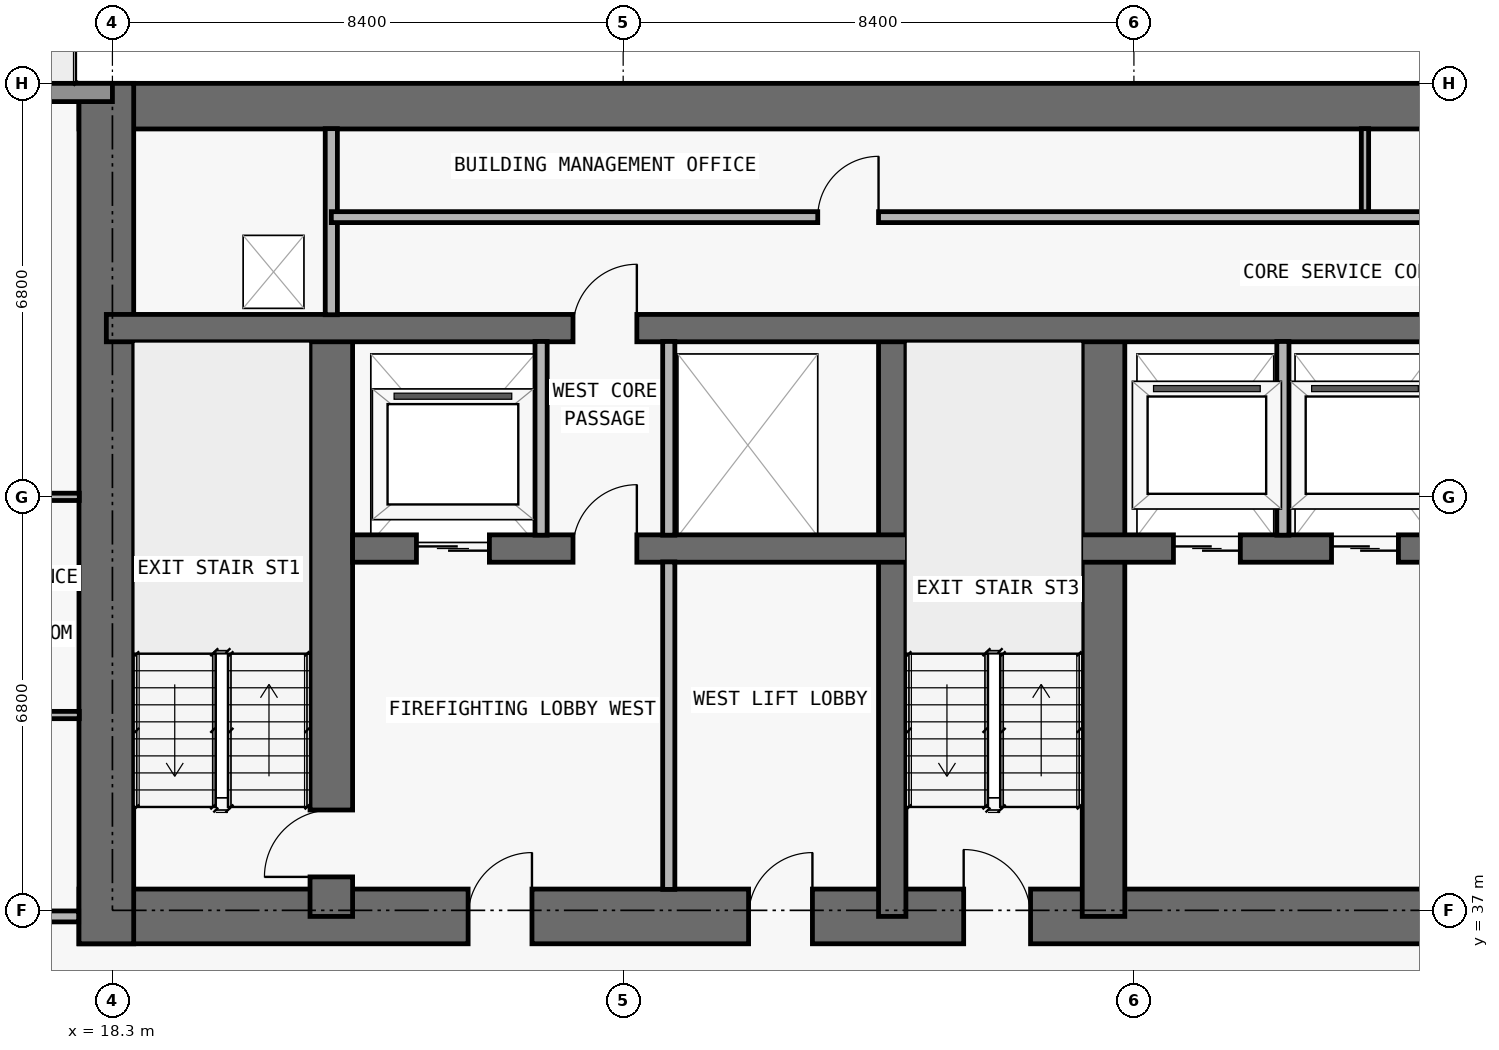
"""IFC4 building model, lengths in metres.
Left out: names, types, materials, properties, quantities, classifications, styles, units other than length and angle.
Written with IfcOpenShell. Run it as: python <this file> out.ifc"""

import sys

from ifc_helpers import new_model, si_unit, direction, frame, frame_2d, origin, place, context, subcontext, project, spatial, rectangle, extrude, element, fill, save


model = new_model("IFC4")
c1 = context("Model", 3, precision=1e-05, world=origin(), true_north=direction((0.0, 1.0)))
c2 = subcontext(c1, "Body", "Model", "MODEL_VIEW")
j1 = project(units=[si_unit("LENGTHUNIT", "METRE"), si_unit("PLANEANGLEUNIT", "RADIAN")], contexts=[c1])
p1 = place(None, origin())
s1 = spatial("IfcSite", under=j1, at=p1, CompositionType="ELEMENT")
p2 = place(p1, origin())
s2 = spatial("IfcBuilding", under=s1, at=p2, CompositionType="ELEMENT")
p3 = place(p2, frame((0.0, 0.0, 33.3)))
s3 = spatial("IfcBuildingStorey", under=s2, at=p3, CompositionType="ELEMENT", Elevation=33.3)
p4 = place(p3, frame((17.75, 36.9, 0.0), z_axis=(0.0, 0.0, 1.0), x_axis=(1.0, 0.0, 0.0)))
e1 = element("IfcWall", 1, at=p4, inside=s3, PredefinedType="SHEAR", context=c2, shape_type="SweptSolid", body=[
    extrude(rectangle(XDim=42.3, YDim=0.9, at=frame_2d((21.15, 0.0))), origin(), (0.0, 0.0, 1.0), 3.05),
])
p5 = place(p4, frame((14.55, 0.0, 0.0)))
e2 = element("IfcOpeningElement", 2, at=p5, cuts=e1, PredefinedType="OPENING", context=c2, shape_type="SweptSolid", body=[
    extrude(rectangle(XDim=1.1, YDim=2.15, at=frame_2d((0.55, 1.075))), frame((0.0, 0.46, 0.0), z_axis=(0.0, -1.0, 0.0), x_axis=(1.0, 0.0, 0.0)), (0.0, 0.0, 1.0), 0.92),
])
p6 = place(p4, frame((6.4, 0.0, 0.0)))
e3 = element("IfcOpeningElement", 3, at=p6, cuts=e1, PredefinedType="OPENING", context=c2, shape_type="SweptSolid", body=[
    extrude(rectangle(XDim=1.05, YDim=2.15, at=frame_2d((0.525, 1.075))), frame((0.0, 0.46, 0.0), z_axis=(0.0, -1.0, 0.0), x_axis=(1.0, 0.0, 0.0)), (0.0, 0.0, 1.0), 0.92),
])
p7 = place(p4, frame((34.9, 0.0, 0.0)))
e4 = element("IfcOpeningElement", 4, at=p7, cuts=e1, PredefinedType="OPENING", context=c2, shape_type="SweptSolid", body=[
    extrude(rectangle(XDim=1.05, YDim=2.15, at=frame_2d((0.525, 1.075))), frame((0.0, 0.46, 0.0), z_axis=(0.0, -1.0, 0.0), x_axis=(1.0, 0.0, 0.0)), (0.0, 0.0, 1.0), 0.92),
])
p8 = place(p4, frame((11.012, 0.0, 0.0)))
e5 = element("IfcOpeningElement", 5, at=p8, cuts=e1, PredefinedType="OPENING", context=c2, shape_type="SweptSolid", body=[
    extrude(rectangle(XDim=1.05, YDim=2.15, at=frame_2d((0.525, 1.075))), frame((0.0, 0.46, 0.0), z_axis=(0.0, -1.0, 0.0), x_axis=(1.0, 0.0, 0.0)), (0.0, 0.0, 1.0), 0.92),
])
p9 = place(p4, frame((24.25, 0.0, 0.0)))
e6 = element("IfcOpeningElement", 6, at=p9, cuts=e1, PredefinedType="OPENING", context=c2, shape_type="SweptSolid", body=[
    extrude(rectangle(XDim=1.05, YDim=2.15, at=frame_2d((0.525, 1.075))), frame((0.0, 0.46, 0.0), z_axis=(0.0, -1.0, 0.0), x_axis=(1.0, 0.0, 0.0)), (0.0, 0.0, 1.0), 0.92),
])
p10 = place(p3, frame((17.75, 50.225, 0.0), z_axis=(0.0, 0.0, 1.0), x_axis=(1.0, 0.0, 0.0)))
e7 = element("IfcWall", 7, at=p10, inside=s3, PredefinedType="SHEAR", context=c2, shape_type="SweptSolid", body=[
    extrude(rectangle(XDim=42.3, YDim=0.75, at=frame_2d((21.15, 0.0))), origin(), (0.0, 0.0, 1.0), 3.05),
])
p11 = place(p3, frame((18.2, 36.45, 0.0), z_axis=(0.0, 0.0, 1.0), x_axis=(0.0, 1.0, 0.0)))
e8 = element("IfcWall", 8, at=p11, inside=s3, PredefinedType="SHEAR", context=c2, shape_type="SweptSolid", body=[
    extrude(rectangle(XDim=14.15, YDim=0.9, at=frame_2d((7.075, 0.0))), origin(), (0.0, 0.0, 1.0), 3.05),
])
p12 = place(p3, frame((21.9, 36.9, 0.0), z_axis=(0.0, 0.0, 1.0), x_axis=(0.0, 1.0, 0.0)))
e9 = element("IfcWall", 9, at=p12, inside=s3, PredefinedType="SHEAR", context=c2, shape_type="SweptSolid", body=[
    extrude(rectangle(XDim=9.675, YDim=0.7, at=frame_2d((4.837, 0.0))), origin(), (0.0, 0.0, 1.0), 3.05),
])
p13 = place(p12, frame((0.65, 0.0, 0.0)))
e10 = element("IfcOpeningElement", 10, at=p13, cuts=e9, PredefinedType="OPENING", context=c2, shape_type="SweptSolid", body=[
    extrude(rectangle(XDim=1.1, YDim=2.15, at=frame_2d((0.55, 1.075))), frame((0.0, 0.36, 0.0), z_axis=(0.0, -1.0, 0.0), x_axis=(1.0, 0.0, 0.0)), (0.0, 0.0, 1.0), 0.72),
])
p14 = place(p3, frame((31.125, 36.9, 0.0), z_axis=(0.0, 0.0, 1.0), x_axis=(0.0, 1.0, 0.0)))
e11 = element("IfcWall", 11, at=p14, inside=s3, PredefinedType="SHEAR", context=c2, shape_type="SweptSolid", body=[
    extrude(rectangle(XDim=9.675, YDim=0.45, at=frame_2d((4.837, 0.0))), origin(), (0.0, 0.0, 1.0), 3.05),
])
p15 = place(p3, frame((34.6, 36.9, 0.0), z_axis=(0.0, 0.0, 1.0), x_axis=(0.0, 1.0, 0.0)))
e12 = element("IfcWall", 12, at=p15, inside=s3, PredefinedType="SHEAR", context=c2, shape_type="SweptSolid", body=[
    extrude(rectangle(XDim=9.675, YDim=0.7, at=frame_2d((4.837, 0.0))), origin(), (0.0, 0.0, 1.0), 3.05),
])
p16 = place(p3, frame((22.25, 42.95, 0.0), z_axis=(0.0, 0.0, 1.0), x_axis=(1.0, 0.0, 0.0)))
e13 = element("IfcWall", 13, at=p16, inside=s3, PredefinedType="SHEAR", context=c2, shape_type="SweptSolid", body=[
    extrude(rectangle(XDim=33.3, YDim=0.45, at=frame_2d((16.65, 0.0))), origin(), (0.0, 0.0, 1.0), 3.05),
])
p17 = place(p16, frame((1.05, 0.0, 0.0)))
e14 = element("IfcOpeningElement", 14, at=p17, cuts=e13, PredefinedType="OPENING", context=c2, shape_type="SweptSolid", body=[
    extrude(rectangle(XDim=1.2, YDim=2.2, at=frame_2d((0.6, 1.1))), frame((0.0, 0.235, 0.0), z_axis=(0.0, -1.0, 0.0), x_axis=(1.0, 0.0, 0.0)), (0.0, 0.0, 1.0), 0.47),
])
p18 = place(p16, frame((31.05, 0.0, 0.0)))
e15 = element("IfcOpeningElement", 15, at=p18, cuts=e13, PredefinedType="OPENING", context=c2, shape_type="SweptSolid", body=[
    extrude(rectangle(XDim=1.2, YDim=2.2, at=frame_2d((0.6, 1.1))), frame((0.0, 0.235, 0.0), z_axis=(0.0, -1.0, 0.0), x_axis=(1.0, 0.0, 0.0)), (0.0, 0.0, 1.0), 0.47),
])
p19 = place(p16, frame((13.5, 0.0, 0.0)))
e16 = element("IfcOpeningElement", 16, at=p19, cuts=e13, PredefinedType="OPENING", context=c2, shape_type="SweptSolid", body=[
    extrude(rectangle(XDim=1.1, YDim=2.2, at=frame_2d((0.55, 1.1))), frame((0.0, 0.235, 0.0), z_axis=(0.0, -1.0, 0.0), x_axis=(1.0, 0.0, 0.0)), (0.0, 0.0, 1.0), 0.47),
])
p20 = place(p16, frame((16.1, 0.0, 0.0)))
e17 = element("IfcOpeningElement", 17, at=p20, cuts=e13, PredefinedType="OPENING", context=c2, shape_type="SweptSolid", body=[
    extrude(rectangle(XDim=1.1, YDim=2.2, at=frame_2d((0.55, 1.1))), frame((0.0, 0.235, 0.0), z_axis=(0.0, -1.0, 0.0), x_axis=(1.0, 0.0, 0.0)), (0.0, 0.0, 1.0), 0.47),
])
p21 = place(p16, frame((18.7, 0.0, 0.0)))
e18 = element("IfcOpeningElement", 18, at=p21, cuts=e13, PredefinedType="OPENING", context=c2, shape_type="SweptSolid", body=[
    extrude(rectangle(XDim=1.1, YDim=2.2, at=frame_2d((0.55, 1.1))), frame((0.0, 0.235, 0.0), z_axis=(0.0, -1.0, 0.0), x_axis=(1.0, 0.0, 0.0)), (0.0, 0.0, 1.0), 0.47),
])
p22 = place(p16, frame((3.625, 0.0, 0.0)))
e19 = element("IfcOpeningElement", 19, at=p22, cuts=e13, PredefinedType="OPENING", context=c2, shape_type="SweptSolid", body=[
    extrude(rectangle(XDim=1.05, YDim=2.15, at=frame_2d((0.525, 1.075))), frame((0.0, 0.235, 0.0), z_axis=(0.0, -1.0, 0.0), x_axis=(1.0, 0.0, 0.0)), (0.0, 0.0, 1.0), 0.47),
])
p23 = place(p16, frame((28.675, 0.0, 0.0)))
e20 = element("IfcOpeningElement", 20, at=p23, cuts=e13, PredefinedType="OPENING", context=c2, shape_type="SweptSolid", body=[
    extrude(rectangle(XDim=1.05, YDim=2.15, at=frame_2d((0.525, 1.075))), frame((0.0, 0.235, 0.0), z_axis=(0.0, -1.0, 0.0), x_axis=(1.0, 0.0, 0.0)), (0.0, 0.0, 1.0), 0.47),
])
p24 = place(p3, frame((18.2, 46.575, 0.0), z_axis=(0.0, 0.0, 1.0), x_axis=(1.0, 0.0, 0.0)))
e21 = element("IfcWall", 21, at=p24, inside=s3, PredefinedType="SHEAR", context=c2, shape_type="SweptSolid", body=[
    extrude(rectangle(XDim=41.4, YDim=0.45, at=frame_2d((20.7, 0.0))), origin(), (0.0, 0.0, 1.0), 3.05),
])
p25 = place(p24, frame((7.675, 0.0, 0.0)))
e22 = element("IfcOpeningElement", 22, at=p25, cuts=e21, PredefinedType="OPENING", context=c2, shape_type="SweptSolid", body=[
    extrude(rectangle(XDim=1.05, YDim=2.15, at=frame_2d((0.525, 1.075))), frame((0.0, 0.235, 0.0), z_axis=(0.0, -1.0, 0.0), x_axis=(1.0, 0.0, 0.0)), (0.0, 0.0, 1.0), 0.47),
])
p26 = place(p24, frame((32.725, 0.0, 0.0)))
e23 = element("IfcOpeningElement", 23, at=p26, cuts=e21, PredefinedType="OPENING", context=c2, shape_type="SweptSolid", body=[
    extrude(rectangle(XDim=1.05, YDim=2.15, at=frame_2d((0.525, 1.075))), frame((0.0, 0.235, 0.0), z_axis=(0.0, -1.0, 0.0), x_axis=(1.0, 0.0, 0.0)), (0.0, 0.0, 1.0), 0.47),
])
p27 = place(p3, frame((5.1, 50.45, 0.0), z_axis=(0.0, 0.0, 1.0), x_axis=(1.0, 0.0, 0.0)))
e24 = element("IfcWall", 24, at=p27, inside=s3, PredefinedType="STANDARD", context=c2, shape_type="SweptSolid", body=[
    extrude(rectangle(XDim=13.2, YDim=0.3, at=frame_2d((6.6, 0.0))), origin(), (0.0, 0.0, 1.0), 3.05),
])
p28 = place(p27, frame((5.6, 0.0, 0.0)))
e25 = element("IfcOpeningElement", 25, at=p28, cuts=e24, PredefinedType="OPENING", context=c2, shape_type="SweptSolid", body=[
    extrude(rectangle(XDim=2.0, YDim=2.3, at=frame_2d((1.0, 1.15))), frame((0.0, 0.16, 0.0), z_axis=(0.0, -1.0, 0.0), x_axis=(1.0, 0.0, 0.0)), (0.0, 0.0, 1.0), 0.32),
])
p29 = place(p3, frame((21.9, 46.795, 0.0), z_axis=(0.0, 0.0, 1.0), x_axis=(0.0, 1.0, 0.0)))
e26 = element("IfcWall", 26, at=p29, inside=s3, PredefinedType="PARTITIONING", context=c2, shape_type="SweptSolid", body=[
    extrude(rectangle(XDim=3.06, YDim=0.2, at=frame_2d((1.53, 0.0))), origin(), (0.0, 0.0, 1.0), 3.05),
])
p30 = place(p3, frame((25.35, 43.17, 0.0), z_axis=(0.0, 0.0, 1.0), x_axis=(0.0, 1.0, 0.0)))
e27 = element("IfcWall", 27, at=p30, inside=s3, PredefinedType="PARTITIONING", context=c2, shape_type="SweptSolid", body=[
    extrude(rectangle(XDim=3.185, YDim=0.2, at=frame_2d((1.593, 0.0))), origin(), (0.0, 0.0, 1.0), 3.05),
])
p31 = place(p3, frame((27.45, 37.345, 0.0), z_axis=(0.0, 0.0, 1.0), x_axis=(0.0, 1.0, 0.0)))
e28 = element("IfcWall", 28, at=p31, inside=s3, PredefinedType="PARTITIONING", context=c2, shape_type="SweptSolid", body=[
    extrude(rectangle(XDim=5.385, YDim=0.2, at=frame_2d((2.692, 0.0))), origin(), (0.0, 0.0, 1.0), 3.05),
])
for number, where, z_axis, x_axis in (
    (29, (27.45, 43.17, 0.0), (0.0, 0.0, 1.0), (0.0, 1.0, 0.0)),
    (30, (37.55, 43.17, 0.0), (0.0, 0.0, 1.0), (0.0, 1.0, 0.0)),
):
    element("IfcWall", number, at=place(p3, frame(where, z_axis=z_axis, x_axis=x_axis)), inside=s3, PredefinedType="PARTITIONING", context=c2, shape_type="SweptSolid", body=[
        extrude(rectangle(XDim=3.185, YDim=0.2, at=frame_2d((1.593, 0.0))), origin(), (0.0, 0.0, 1.0), 3.05),
    ])
p32 = place(p3, frame((38.9, 48.4, 0.0), z_axis=(0.0, 0.0, 1.0), x_axis=(0.0, 1.0, 0.0)))
e31 = element("IfcWall", 31, at=p32, inside=s3, PredefinedType="PARTITIONING", context=c2, shape_type="SweptSolid", body=[
    extrude(rectangle(XDim=1.455, YDim=0.12, at=frame_2d((0.728, 0.0))), origin(), (0.0, 0.0, 1.0), 3.05),
])
p33 = place(p3, frame((5.1, 36.9, 0.0), z_axis=(0.0, 0.0, 1.0), x_axis=(1.0, 0.0, 0.0)))
e32 = element("IfcWall", 32, at=p33, inside=s3, PredefinedType="PARTITIONING", context=c2, shape_type="SweptSolid", body=[
    extrude(rectangle(XDim=12.645, YDim=0.18, at=frame_2d((6.323, 0.0))), origin(), (0.0, 0.0, 1.0), 3.05),
])
p34 = place(p33, frame((7.125, 0.0, 0.0)))
e33 = element("IfcOpeningElement", 33, at=p34, cuts=e32, PredefinedType="OPENING", context=c2, shape_type="SweptSolid", body=[
    extrude(rectangle(XDim=1.0, YDim=2.2, at=frame_2d((0.5, 1.1))), frame((0.0, 0.1, 0.0), z_axis=(0.0, -1.0, 0.0), x_axis=(1.0, 0.0, 0.0)), (0.0, 0.0, 1.0), 0.2),
])
p35 = place(p3, frame((15.55, 40.212, 0.0), z_axis=(0.0, 0.0, 1.0), x_axis=(1.0, 0.0, 0.0)))
e34 = element("IfcWall", 34, at=p35, inside=s3, PredefinedType="PARTITIONING", context=c2, shape_type="SweptSolid", body=[
    extrude(rectangle(XDim=2.205, YDim=0.12, at=frame_2d((1.103, 0.0))), origin(), (0.0, 0.0, 1.0), 3.05),
])
p36 = place(p3, frame((1.795, 43.8, 0.0), z_axis=(0.0, 0.0, 1.0), x_axis=(1.0, 0.0, 0.0)))
e35 = element("IfcWall", 35, at=p36, inside=s3, PredefinedType="PARTITIONING", context=c2, shape_type="SweptSolid", body=[
    extrude(rectangle(XDim=15.96, YDim=0.12, at=frame_2d((7.98, 0.0))), origin(), (0.0, 0.0, 1.0), 2.339),
])
p37 = place(p36, frame((5.255, 0.0, 0.0)))
e36 = element("IfcOpeningElement", 36, at=p37, cuts=e35, PredefinedType="OPENING", context=c2, shape_type="SweptSolid", body=[
    extrude(rectangle(XDim=0.9, YDim=2.15, at=frame_2d((0.45, 1.075))), frame((0.0, 0.07, 0.0), z_axis=(0.0, -1.0, 0.0), x_axis=(1.0, 0.0, 0.0)), (0.0, 0.0, 1.0), 0.14),
])
p38 = place(p36, frame((10.48, 0.0, 0.0)))
e37 = element("IfcOpeningElement", 37, at=p38, cuts=e35, PredefinedType="OPENING", context=c2, shape_type="SweptSolid", body=[
    extrude(rectangle(XDim=0.9, YDim=2.15, at=frame_2d((0.45, 1.075))), frame((0.0, 0.07, 0.0), z_axis=(0.0, -1.0, 0.0), x_axis=(1.0, 0.0, 0.0)), (0.0, 0.0, 1.0), 0.14),
])
p39 = place(p36, frame((14.433, 0.0, 0.0)))
e38 = element("IfcOpeningElement", 38, at=p39, cuts=e35, PredefinedType="OPENING", context=c2, shape_type="SweptSolid", body=[
    extrude(rectangle(XDim=0.85, YDim=2.1, at=frame_2d((0.425, 1.05))), frame((0.0, 0.07, 0.0), z_axis=(0.0, -1.0, 0.0), x_axis=(1.0, 0.0, 0.0)), (0.0, 0.0, 1.0), 0.14),
])
p40 = place(p3, frame((21.9, 48.4, 0.0), z_axis=(0.0, 0.0, 1.0), x_axis=(1.0, 0.0, 0.0)))
e39 = element("IfcWall", 39, at=p40, inside=s3, PredefinedType="PARTITIONING", context=c2, shape_type="SweptSolid", body=[
    extrude(rectangle(XDim=33.986, YDim=0.18, at=frame_2d((16.993, 0.0))), origin(), (0.0, 0.0, 1.0), 3.05),
])
p41 = place(p40, frame((8.0, 0.0, 0.0)))
e40 = element("IfcOpeningElement", 40, at=p41, cuts=e39, PredefinedType="OPENING", context=c2, shape_type="SweptSolid", body=[
    extrude(rectangle(XDim=1.0, YDim=2.2, at=frame_2d((0.5, 1.1))), frame((0.0, 0.1, 0.0), z_axis=(0.0, -1.0, 0.0), x_axis=(1.0, 0.0, 0.0)), (0.0, 0.0, 1.0), 0.2),
])
p42 = place(p40, frame((24.993, 0.0, 0.0)))
e41 = element("IfcOpeningElement", 41, at=p42, cuts=e39, PredefinedType="OPENING", context=c2, shape_type="SweptSolid", body=[
    extrude(rectangle(XDim=1.0, YDim=2.2, at=frame_2d((0.5, 1.1))), frame((0.0, 0.1, 0.0), z_axis=(0.0, -1.0, 0.0), x_axis=(1.0, 0.0, 0.0)), (0.0, 0.0, 1.0), 0.2),
])
p43 = place(p17, origin())
e42 = element("IfcDoor", 42, at=p43, inside=s3, OperationType="DOUBLE_DOOR_SLIDING", PredefinedType="DOOR", context=c2, shape_type="SweptSolid", body=[
    extrude(rectangle(XDim=1.2, YDim=2.2, at=frame_2d((0.6, 1.1))), frame((0.0, 0.025, 0.0), z_axis=(0.0, -1.0, 0.0), x_axis=(1.0, 0.0, 0.0)), (0.0, 0.0, 1.0), 0.05),
])
fill(e14, e42)
p44 = place(p19, origin())
e43 = element("IfcDoor", 43, at=p44, inside=s3, OperationType="DOUBLE_DOOR_SLIDING", PredefinedType="DOOR", context=c2, shape_type="SweptSolid", body=[
    extrude(rectangle(XDim=1.1, YDim=2.2, at=frame_2d((0.55, 1.1))), frame((0.0, 0.025, 0.0), z_axis=(0.0, -1.0, 0.0), x_axis=(1.0, 0.0, 0.0)), (0.0, 0.0, 1.0), 0.05),
])
fill(e16, e43)
p45 = place(p20, origin())
e44 = element("IfcDoor", 44, at=p45, inside=s3, OperationType="DOUBLE_DOOR_SLIDING", PredefinedType="DOOR", context=c2, shape_type="SweptSolid", body=[
    extrude(rectangle(XDim=1.1, YDim=2.2, at=frame_2d((0.55, 1.1))), frame((0.0, 0.025, 0.0), z_axis=(0.0, -1.0, 0.0), x_axis=(1.0, 0.0, 0.0)), (0.0, 0.0, 1.0), 0.05),
])
fill(e17, e44)
p46 = place(p5, origin())
e45 = element("IfcDoor", 45, at=p46, inside=s3, OperationType="SINGLE_SWING_LEFT", PredefinedType="DOOR", context=c2, shape_type="SweptSolid", body=[
    extrude(rectangle(XDim=1.1, YDim=2.15, at=frame_2d((0.55, 1.075))), frame((0.0, 0.025, 0.0), z_axis=(0.0, -1.0, 0.0), x_axis=(1.0, 0.0, 0.0)), (0.0, 0.0, 1.0), 0.05),
])
fill(e2, e45)
p47 = place(p6, origin())
e46 = element("IfcDoor", 46, at=p47, inside=s3, OperationType="SINGLE_SWING_RIGHT", PredefinedType="DOOR", context=c2, shape_type="SweptSolid", body=[
    extrude(rectangle(XDim=1.05, YDim=2.15, at=frame_2d((0.525, 1.075))), frame((0.0, 0.025, 0.0), z_axis=(0.0, -1.0, 0.0), x_axis=(1.0, 0.0, 0.0)), (0.0, 0.0, 1.0), 0.05),
])
fill(e3, e46)
p48 = place(p13, origin())
e47 = element("IfcDoor", 47, at=p48, inside=s3, OperationType="SINGLE_SWING_LEFT", PredefinedType="DOOR", context=c2, shape_type="SweptSolid", body=[
    extrude(rectangle(XDim=1.1, YDim=2.15, at=frame_2d((0.55, 1.075))), frame((0.0, 0.025, 0.0), z_axis=(0.0, -1.0, 0.0), x_axis=(1.0, 0.0, 0.0)), (0.0, 0.0, 1.0), 0.05),
])
fill(e10, e47)
p49 = place(p22, origin())
e48 = element("IfcDoor", 48, at=p49, inside=s3, OperationType="SINGLE_SWING_RIGHT", PredefinedType="DOOR", context=c2, shape_type="SweptSolid", body=[
    extrude(rectangle(XDim=1.05, YDim=2.15, at=frame_2d((0.525, 1.075))), frame((0.0, 0.025, 0.0), z_axis=(0.0, -1.0, 0.0), x_axis=(1.0, 0.0, 0.0)), (0.0, 0.0, 1.0), 0.05),
])
fill(e19, e48)
p50 = place(p8, origin())
e49 = element("IfcDoor", 49, at=p50, inside=s3, OperationType="SINGLE_SWING_RIGHT", PredefinedType="DOOR", context=c2, shape_type="SweptSolid", body=[
    extrude(rectangle(XDim=1.05, YDim=2.15, at=frame_2d((0.525, 1.075))), frame((0.0, 0.025, 0.0), z_axis=(0.0, -1.0, 0.0), x_axis=(1.0, 0.0, 0.0)), (0.0, 0.0, 1.0), 0.05),
])
fill(e5, e49)
p51 = place(p25, origin())
e50 = element("IfcDoor", 50, at=p51, inside=s3, OperationType="SINGLE_SWING_RIGHT", PredefinedType="DOOR", context=c2, shape_type="SweptSolid", body=[
    extrude(rectangle(XDim=1.05, YDim=2.15, at=frame_2d((0.525, 1.075))), frame((0.0, 0.025, 0.0), z_axis=(0.0, -1.0, 0.0), x_axis=(1.0, 0.0, 0.0)), (0.0, 0.0, 1.0), 0.05),
])
fill(e22, e50)
p52 = place(p41, origin())
e51 = element("IfcDoor", 51, at=p52, inside=s3, OperationType="SINGLE_SWING_RIGHT", PredefinedType="DOOR", context=c2, shape_type="SweptSolid", body=[
    extrude(rectangle(XDim=1.0, YDim=2.2, at=frame_2d((0.5, 1.1))), frame((0.0, 0.025, 0.0), z_axis=(0.0, -1.0, 0.0), x_axis=(1.0, 0.0, 0.0)), (0.0, 0.0, 1.0), 0.05),
])
fill(e40, e51)
save(model, sys.argv[1])
